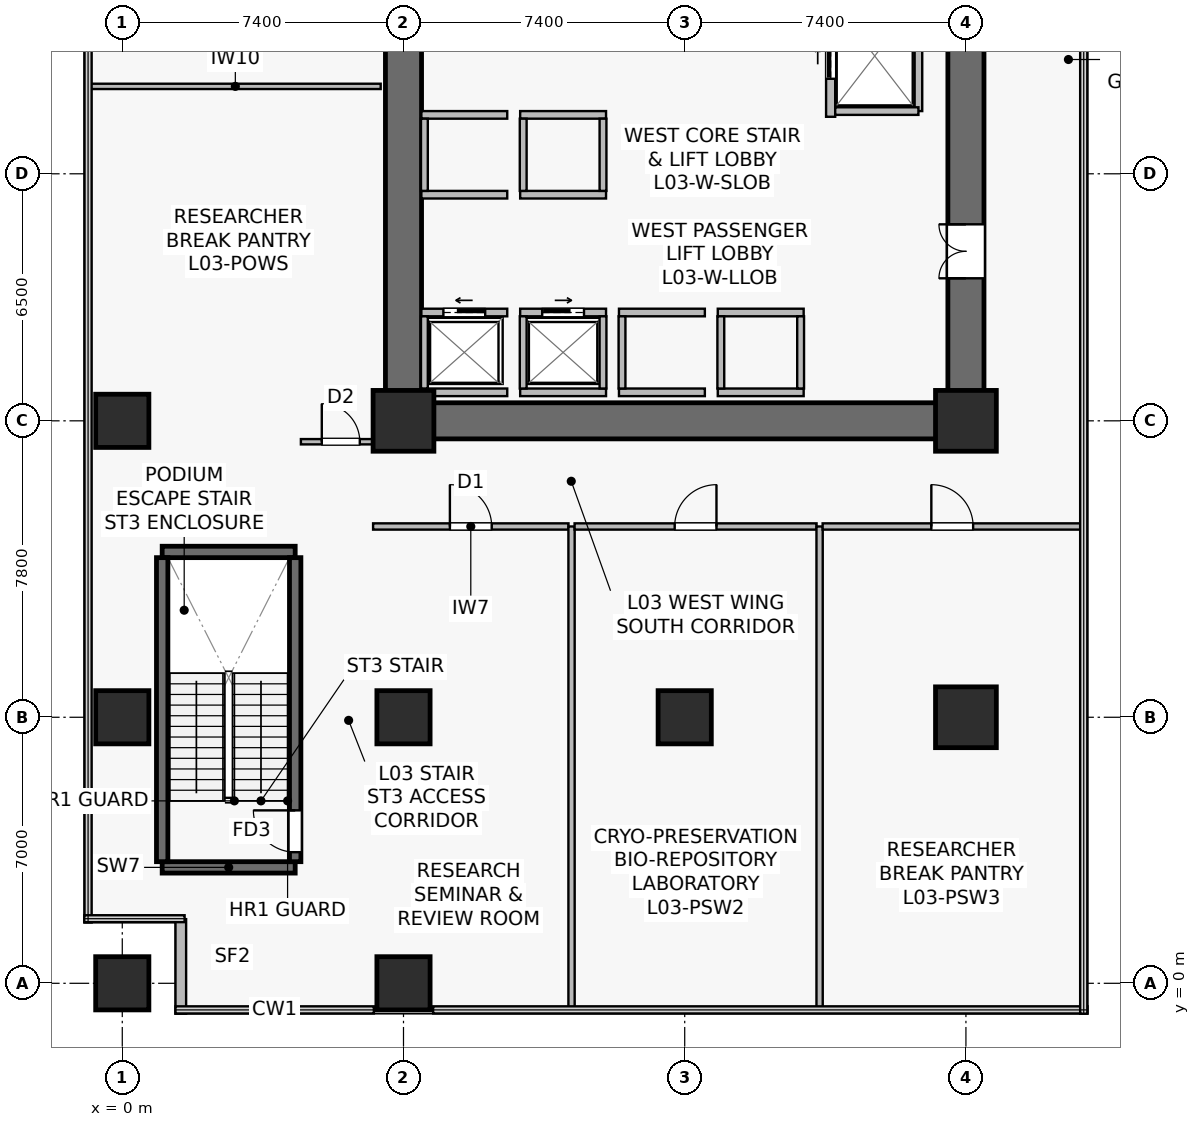
"""IFC4 building model, lengths in metres.
Left out: names, types, materials, properties, quantities, classifications, styles, units other than length and angle.
Written with IfcOpenShell. Run it as: python <this file> out.ifc"""

import sys

from ifc_helpers import new_model, si_unit, direction, frame, frame_2d, origin, origin_2d, place, context, subcontext, project, spatial, rectangle, extrude, source, transform, mapped, element, fill, save


model = new_model("IFC4")
c1 = context("Model", 3, precision=1e-05, world=origin(), true_north=direction((0.0, 1.0)))
c2 = subcontext(c1, "Body", "Model", "MODEL_VIEW")
j1 = project(units=[si_unit("LENGTHUNIT", "METRE"), si_unit("PLANEANGLEUNIT", "RADIAN")], contexts=[c1])
p1 = place(None, origin())
s1 = spatial("IfcSite", under=j1, at=p1, CompositionType="ELEMENT")
p2 = place(p1, origin())
s2 = spatial("IfcBuilding", under=s1, at=p2, CompositionType="ELEMENT")
p3 = place(p2, frame((0.0, 0.0, 10.2)))
s3 = spatial("IfcBuildingStorey", under=s2, at=p3, CompositionType="ELEMENT", Elevation=10.2)
p4 = place(p3, frame((6.925, 14.8, 0.0), z_axis=(0.0, 0.0, 1.0), x_axis=(1.0, 0.0, 0.0)))
e1 = element("IfcWall", 1, at=p4, inside=s3, PredefinedType="SHEAR", context=c2, shape_type="SweptSolid", body=[
    extrude(rectangle(XDim=15.75, YDim=0.95, at=frame_2d((7.875, 0.0))), origin(), (0.0, 0.0, 1.0), 4.45),
])
p5 = place(p3, frame((7.4, 15.275, 0.0), z_axis=(0.0, 0.0, 1.0), x_axis=(0.0, 1.0, 0.0)))
e2 = element("IfcWall", 2, at=p5, inside=s3, PredefinedType="SHEAR", context=c2, shape_type="SweptSolid", body=[
    extrude(rectangle(XDim=18.05, YDim=0.95, at=frame_2d((9.025, 0.0))), origin(), (0.0, 0.0, 1.0), 4.45),
])
p6 = place(p3, frame((22.2, 15.275, 0.0), z_axis=(0.0, 0.0, 1.0), x_axis=(0.0, 1.0, 0.0)))
e3 = element("IfcWall", 3, at=p6, inside=s3, PredefinedType="SHEAR", context=c2, shape_type="SweptSolid", body=[
    extrude(rectangle(XDim=18.05, YDim=0.95, at=frame_2d((9.025, 0.0))), origin(), (0.0, 0.0, 1.0), 4.45),
])
p7 = place(p6, frame((3.275, 0.0, 0.0)))
e4 = element("IfcOpeningElement", 4, at=p7, cuts=e3, PredefinedType="OPENING", context=c2, shape_type="SweptSolid", body=[
    extrude(rectangle(XDim=1.42, YDim=2.2, at=frame_2d((0.71, 1.1))), frame((0.0, 0.485, 0.0), z_axis=(0.0, -1.0, 0.0), x_axis=(1.0, 0.0, 0.0)), (0.0, 0.0, 1.0), 0.97),
])
for number, where, z_axis, x_axis in (
    (5, (1.05, 3.05, 0.0), (0.0, 0.0, 1.0), (1.0, 0.0, 0.0)),
    (6, (1.05, 11.35, 0.0), (0.0, 0.0, 1.0), (1.0, 0.0, 0.0)),
):
    element("IfcWall", number, at=place(p3, frame(where, z_axis=z_axis, x_axis=x_axis)), inside=s3, PredefinedType="SHEAR", context=c2, shape_type="SweptSolid", body=[
        extrude(rectangle(XDim=3.5, YDim=0.3, at=frame_2d((1.75, 0.0))), origin(), (0.0, 0.0, 1.0), 4.45),
    ])
p8 = place(p3, frame((1.05, 3.2, 0.0), z_axis=(0.0, 0.0, 1.0), x_axis=(0.0, 1.0, 0.0)))
e7 = element("IfcWall", 7, at=p8, inside=s3, PredefinedType="SHEAR", context=c2, shape_type="SweptSolid", body=[
    extrude(rectangle(XDim=8.0, YDim=0.3, at=frame_2d((4.0, 0.0))), origin(), (0.0, 0.0, 1.0), 4.45),
])
p9 = place(p3, frame((4.55, 3.2, 0.0), z_axis=(0.0, 0.0, 1.0), x_axis=(0.0, 1.0, 0.0)))
e8 = element("IfcWall", 8, at=p9, inside=s3, PredefinedType="SHEAR", context=c2, shape_type="SweptSolid", body=[
    extrude(rectangle(XDim=8.0, YDim=0.3, at=frame_2d((4.0, 0.0))), origin(), (0.0, 0.0, 1.0), 4.45),
])
p10 = place(p9, frame((0.25, 0.0, 0.0)))
e9 = element("IfcOpeningElement", 9, at=p10, cuts=e8, PredefinedType="OPENING", context=c2, shape_type="SweptSolid", body=[
    extrude(rectangle(XDim=1.1, YDim=2.15, at=frame_2d((0.55, 1.075))), frame((0.0, 0.16, 0.0), z_axis=(0.0, -1.0, 0.0), x_axis=(1.0, 0.0, 0.0)), (0.0, 0.0, 1.0), 0.32),
])
m1 = source(origin(), c2, "Body", "SweptSolid", [
    extrude(rectangle(XDim=1.4, YDim=1.4, at=origin_2d()), origin(), (0.0, 0.0, 1.0), 4.8),
])
p11 = place(p3, frame((14.8, 7.0, 0.0), z_axis=(0.0, 0.0, 1.0), x_axis=(1.0, 0.0, 0.0)))
e10 = element("IfcColumn", 10, at=p11, inside=s3, PredefinedType="COLUMN", context=c2, shape_type="MappedRepresentation", body=[
    mapped(m1, transform((0.0, 0.0, 0.0), scale=1.0)),
])
m2 = source(origin(), c2, "Body", "SweptSolid", [
    extrude(rectangle(XDim=1.6, YDim=1.6, at=origin_2d()), origin(), (0.0, 0.0, 1.0), 4.8),
])
for number, where, z_axis, x_axis in (
    (11, (22.2, 7.0, 0.0), (0.0, 0.0, 1.0), (1.0, 0.0, 0.0)),
    (12, (7.4, 14.8, 0.0), (0.0, 0.0, 1.0), (1.0, 0.0, 0.0)),
    (13, (22.2, 14.8, 0.0), (0.0, 0.0, 1.0), (1.0, 0.0, 0.0)),
):
    element("IfcColumn", number, at=place(p3, frame(where, z_axis=z_axis, x_axis=x_axis)), inside=s3, PredefinedType="COLUMN", context=c2, shape_type="MappedRepresentation", body=[
        mapped(m2, transform((0.0, 0.0, 0.0), scale=1.0)),
    ])
for number, where, z_axis, x_axis in (
    (14, (7.4, 7.0, 0.0), (0.0, 0.0, 1.0), (1.0, 0.0, 0.0)),
    (15, (0.0, 7.0, 0.0), (0.0, 0.0, 1.0), (1.0, 0.0, 0.0)),
    (16, (0.0, 14.8, 0.0), (0.0, 0.0, 1.0), (1.0, 0.0, 0.0)),
    (17, (0.0, 0.0, 0.0), (0.0, 0.0, 1.0), (1.0, 0.0, 0.0)),
    (18, (7.4, 0.0, 0.0), (0.0, 0.0, 1.0), (1.0, 0.0, 0.0)),
):
    element("IfcColumn", number, at=place(p3, frame(where, z_axis=z_axis, x_axis=x_axis)), inside=s3, PredefinedType="COLUMN", context=c2, shape_type="MappedRepresentation", body=[
        mapped(m1, transform((0.0, 0.0, 0.0), scale=1.0)),
    ])
p12 = place(p3, frame((1.54, 1.688, 0.0), z_axis=(0.0, 0.0, 1.0), x_axis=(0.0, -1.0, 0.0)))
e19 = element("IfcWall", 19, at=p12, inside=s3, PredefinedType="STANDARD", context=c2, shape_type="SweptSolid", body=[
    extrude(rectangle(XDim=2.488, YDim=0.28, at=frame_2d((1.244, 0.0))), origin(), (0.0, 0.0, 1.0), 4.45),
])
p13 = place(p3, frame((18.64, 22.8, 0.0), z_axis=(0.0, 0.0, 1.0), x_axis=(0.0, 1.0, 0.0)))
e20 = element("IfcWall", 20, at=p13, inside=s3, PredefinedType="SOLIDWALL", context=c2, shape_type="SweptSolid", body=[
    extrude(rectangle(XDim=6.85, YDim=0.24, at=frame_2d((3.425, 0.0))), origin(), (0.0, 0.0, 1.0), 3.535),
])
p14 = place(p13, frame((4.85, 0.0, 0.0)))
e21 = element("IfcOpeningElement", 21, at=p14, cuts=e20, PredefinedType="OPENING", context=c2, shape_type="SweptSolid", body=[
    extrude(rectangle(XDim=1.1, YDim=2.22, at=frame_2d((0.55, 1.11))), frame((0.0, 0.13, 0.0), z_axis=(0.0, -1.0, 0.0), x_axis=(1.0, 0.0, 0.0)), (0.0, 0.0, 1.0), 0.26),
])
p15 = place(p13, frame((1.0, 0.0, 0.0)))
e22 = element("IfcOpeningElement", 22, at=p15, cuts=e20, PredefinedType="OPENING", context=c2, shape_type="SweptSolid", body=[
    extrude(rectangle(XDim=1.2, YDim=2.22, at=frame_2d((0.6, 1.11))), frame((0.0, 0.13, 0.0), z_axis=(0.0, -1.0, 0.0), x_axis=(1.0, 0.0, 0.0)), (0.0, 0.0, 1.0), 0.26),
])
p16 = place(p3, frame((7.87, 17.65, 0.0), z_axis=(0.0, 0.0, 1.0), x_axis=(1.0, 0.0, 0.0)))
e23 = element("IfcWall", 23, at=p16, inside=s3, PredefinedType="SOLIDWALL", context=c2, shape_type="SweptSolid", body=[
    extrude(rectangle(XDim=2.26, YDim=0.2, at=frame_2d((1.13, 0.0))), origin(), (0.0, 0.0, 1.0), 4.45),
])
p17 = place(p16, frame((0.58, 0.0, 0.0)))
e24 = element("IfcOpeningElement", 24, at=p17, cuts=e23, PredefinedType="OPENING", context=c2, shape_type="SweptSolid", body=[
    extrude(rectangle(XDim=1.1, YDim=2.22, at=frame_2d((0.55, 1.11))), frame((0.0, 0.11, 0.0), z_axis=(0.0, -1.0, 0.0), x_axis=(1.0, 0.0, 0.0)), (0.0, 0.0, 1.0), 0.22),
])
p18 = place(p3, frame((7.87, 15.55, 0.0), z_axis=(0.0, 0.0, 1.0), x_axis=(1.0, 0.0, 0.0)))
e25 = element("IfcWall", 25, at=p18, inside=s3, PredefinedType="SOLIDWALL", context=c2, shape_type="SweptSolid", body=[
    extrude(rectangle(XDim=2.26, YDim=0.2, at=frame_2d((1.13, 0.0))), origin(), (0.0, 0.0, 1.0), 4.45),
])
p19 = place(p3, frame((7.95, 15.65, 0.0), z_axis=(0.0, 0.0, 1.0), x_axis=(0.0, 1.0, 0.0)))
e26 = element("IfcWall", 26, at=p19, inside=s3, PredefinedType="SOLIDWALL", context=c2, shape_type="SweptSolid", body=[
    extrude(rectangle(XDim=1.9, YDim=0.18, at=frame_2d((0.95, 0.0))), origin(), (0.0, 0.0, 1.0), 4.45),
])
p20 = place(p3, frame((10.47, 17.65, 0.0), z_axis=(0.0, 0.0, 1.0), x_axis=(1.0, 0.0, 0.0)))
e27 = element("IfcWall", 27, at=p20, inside=s3, PredefinedType="SOLIDWALL", context=c2, shape_type="SweptSolid", body=[
    extrude(rectangle(XDim=2.26, YDim=0.2, at=frame_2d((1.13, 0.0))), origin(), (0.0, 0.0, 1.0), 4.45),
])
p21 = place(p20, frame((0.58, 0.0, 0.0)))
e28 = element("IfcOpeningElement", 28, at=p21, cuts=e27, PredefinedType="OPENING", context=c2, shape_type="SweptSolid", body=[
    extrude(rectangle(XDim=1.1, YDim=2.22, at=frame_2d((0.55, 1.11))), frame((0.0, 0.11, 0.0), z_axis=(0.0, -1.0, 0.0), x_axis=(1.0, 0.0, 0.0)), (0.0, 0.0, 1.0), 0.22),
])
p22 = place(p3, frame((10.47, 15.55, 0.0), z_axis=(0.0, 0.0, 1.0), x_axis=(1.0, 0.0, 0.0)))
e29 = element("IfcWall", 29, at=p22, inside=s3, PredefinedType="SOLIDWALL", context=c2, shape_type="SweptSolid", body=[
    extrude(rectangle(XDim=2.26, YDim=0.2, at=frame_2d((1.13, 0.0))), origin(), (0.0, 0.0, 1.0), 4.45),
])
for number, where, z_axis, x_axis in (
    (30, (10.55, 15.65, 0.0), (0.0, 0.0, 1.0), (0.0, 1.0, 0.0)),
    (31, (12.65, 15.65, 0.0), (0.0, 0.0, 1.0), (0.0, 1.0, 0.0)),
):
    element("IfcWall", number, at=place(p3, frame(where, z_axis=z_axis, x_axis=x_axis)), inside=s3, PredefinedType="SOLIDWALL", context=c2, shape_type="SweptSolid", body=[
        extrude(rectangle(XDim=1.9, YDim=0.18, at=frame_2d((0.95, 0.0))), origin(), (0.0, 0.0, 1.0), 4.45),
    ])
for number, where, z_axis, x_axis in (
    (32, (13.07, 17.65, 0.0), (0.0, 0.0, 1.0), (1.0, 0.0, 0.0)),
    (33, (13.07, 15.55, 0.0), (0.0, 0.0, 1.0), (1.0, 0.0, 0.0)),
):
    element("IfcWall", number, at=place(p3, frame(where, z_axis=z_axis, x_axis=x_axis)), inside=s3, PredefinedType="SOLIDWALL", context=c2, shape_type="SweptSolid", body=[
        extrude(rectangle(XDim=2.26, YDim=0.2, at=frame_2d((1.13, 0.0))), origin(), (0.0, 0.0, 1.0), 3.735),
    ])
p23 = place(p3, frame((13.15, 15.65, 0.0), z_axis=(0.0, 0.0, 1.0), x_axis=(0.0, 1.0, 0.0)))
e34 = element("IfcWall", 34, at=p23, inside=s3, PredefinedType="SOLIDWALL", context=c2, shape_type="SweptSolid", body=[
    extrude(rectangle(XDim=1.9, YDim=0.18, at=frame_2d((0.95, 0.0))), origin(), (0.0, 0.0, 1.0), 4.45),
])
for number, where, z_axis, x_axis in (
    (35, (15.67, 17.65, 0.0), (0.0, 0.0, 1.0), (1.0, 0.0, 0.0)),
    (36, (15.67, 15.55, 0.0), (0.0, 0.0, 1.0), (1.0, 0.0, 0.0)),
):
    element("IfcWall", number, at=place(p3, frame(where, z_axis=z_axis, x_axis=x_axis)), inside=s3, PredefinedType="SOLIDWALL", context=c2, shape_type="SweptSolid", body=[
        extrude(rectangle(XDim=2.26, YDim=0.2, at=frame_2d((1.13, 0.0))), origin(), (0.0, 0.0, 1.0), 4.45),
    ])
for number, where, z_axis, x_axis in (
    (37, (15.75, 15.65, 0.0), (0.0, 0.0, 1.0), (0.0, 1.0, 0.0)),
    (38, (17.85, 15.65, 0.0), (0.0, 0.0, 1.0), (0.0, 1.0, 0.0)),
):
    element("IfcWall", number, at=place(p3, frame(where, z_axis=z_axis, x_axis=x_axis)), inside=s3, PredefinedType="SOLIDWALL", context=c2, shape_type="SweptSolid", body=[
        extrude(rectangle(XDim=1.9, YDim=0.18, at=frame_2d((0.95, 0.0))), origin(), (0.0, 0.0, 1.0), 4.45),
    ])
for number, where, z_axis, x_axis in (
    (39, (7.87, 20.75, 0.0), (0.0, 0.0, 1.0), (1.0, 0.0, 0.0)),
    (40, (7.87, 22.85, 0.0), (0.0, 0.0, 1.0), (1.0, 0.0, 0.0)),
):
    element("IfcWall", number, at=place(p3, frame(where, z_axis=z_axis, x_axis=x_axis)), inside=s3, PredefinedType="SOLIDWALL", context=c2, shape_type="SweptSolid", body=[
        extrude(rectangle(XDim=2.26, YDim=0.2, at=frame_2d((1.13, 0.0))), origin(), (0.0, 0.0, 1.0), 4.45),
    ])
p24 = place(p3, frame((7.95, 20.85, 0.0), z_axis=(0.0, 0.0, 1.0), x_axis=(0.0, 1.0, 0.0)))
e41 = element("IfcWall", 41, at=p24, inside=s3, PredefinedType="SOLIDWALL", context=c2, shape_type="SweptSolid", body=[
    extrude(rectangle(XDim=1.9, YDim=0.18, at=frame_2d((0.95, 0.0))), origin(), (0.0, 0.0, 1.0), 4.45),
])
for number, where, z_axis, x_axis in (
    (42, (10.47, 20.75, 0.0), (0.0, 0.0, 1.0), (1.0, 0.0, 0.0)),
    (43, (10.47, 22.85, 0.0), (0.0, 0.0, 1.0), (1.0, 0.0, 0.0)),
):
    element("IfcWall", number, at=place(p3, frame(where, z_axis=z_axis, x_axis=x_axis)), inside=s3, PredefinedType="SOLIDWALL", context=c2, shape_type="SweptSolid", body=[
        extrude(rectangle(XDim=2.26, YDim=0.2, at=frame_2d((1.13, 0.0))), origin(), (0.0, 0.0, 1.0), 4.45),
    ])
for number, where, z_axis, x_axis in (
    (44, (10.55, 20.85, 0.0), (0.0, 0.0, 1.0), (0.0, 1.0, 0.0)),
    (45, (12.65, 20.85, 0.0), (0.0, 0.0, 1.0), (0.0, 1.0, 0.0)),
):
    element("IfcWall", number, at=place(p3, frame(where, z_axis=z_axis, x_axis=x_axis)), inside=s3, PredefinedType="SOLIDWALL", context=c2, shape_type="SweptSolid", body=[
        extrude(rectangle(XDim=1.9, YDim=0.18, at=frame_2d((0.95, 0.0))), origin(), (0.0, 0.0, 1.0), 4.45),
    ])
p25 = place(p3, frame((20.95, 22.95, 0.0), z_axis=(0.0, 0.0, 1.0), x_axis=(0.0, 1.0, 0.0)))
e46 = element("IfcWall", 46, at=p25, inside=s3, PredefinedType="SOLIDWALL", context=c2, shape_type="SweptSolid", body=[
    extrude(rectangle(XDim=2.9, YDim=0.2, at=frame_2d((1.45, 0.0))), origin(), (0.0, 0.0, 1.0), 3.535),
])
p26 = place(p3, frame((18.76, 22.95, 0.0), z_axis=(0.0, 0.0, 1.0), x_axis=(1.0, 0.0, 0.0)))
e47 = element("IfcWall", 47, at=p26, inside=s3, PredefinedType="SOLIDWALL", context=c2, shape_type="SweptSolid", body=[
    extrude(rectangle(XDim=2.19, YDim=0.2, at=frame_2d((1.095, 0.0))), origin(), (0.0, 0.0, 1.0), 4.45),
])
p27 = place(p3, frame((-0.85, 23.6, 0.0), z_axis=(0.0, 0.0, 1.0), x_axis=(1.0, 0.0, 0.0)))
e48 = element("IfcWall", 48, at=p27, inside=s3, PredefinedType="PARTITIONING", context=c2, shape_type="SweptSolid", body=[
    extrude(rectangle(XDim=7.65, YDim=0.14, at=frame_2d((3.825, 0.0))), origin(), (0.0, 0.0, 1.0), 3.835),
])
p28 = place(p3, frame((4.7, 14.25, 0.0), z_axis=(0.0, 0.0, 1.0), x_axis=(1.0, 0.0, 0.0)))
e49 = element("IfcWall", 49, at=p28, inside=s3, PredefinedType="PARTITIONING", context=c2, shape_type="SweptSolid", body=[
    extrude(rectangle(XDim=2.1, YDim=0.14, at=frame_2d((1.05, 0.0))), origin(), (0.0, 0.0, 1.0), 4.45),
])
p29 = place(p28, frame((0.55, 0.0, 0.0)))
e50 = element("IfcOpeningElement", 50, at=p29, cuts=e49, PredefinedType="OPENING", context=c2, shape_type="SweptSolid", body=[
    extrude(rectangle(XDim=1.0, YDim=2.15, at=frame_2d((0.5, 1.075))), frame((0.0, 0.08, 0.0), z_axis=(0.0, -1.0, 0.0), x_axis=(1.0, 0.0, 0.0)), (0.0, 0.0, 1.0), 0.16),
])
p30 = place(p3, frame((6.6, 12.02, 0.0), z_axis=(0.0, 0.0, 1.0), x_axis=(1.0, 0.0, 0.0)))
e51 = element("IfcWall", 51, at=p30, inside=s3, PredefinedType="PARTITIONING", context=c2, shape_type="SweptSolid", body=[
    extrude(rectangle(XDim=5.142, YDim=0.165, at=frame_2d((2.571, 0.0))), origin(), (0.0, 0.0, 1.0), 3.735),
])
p31 = place(p30, frame((2.021, 0.0, 0.0)))
e52 = element("IfcOpeningElement", 52, at=p31, cuts=e51, PredefinedType="OPENING", context=c2, shape_type="SweptSolid", body=[
    extrude(rectangle(XDim=1.1, YDim=2.18, at=frame_2d((0.55, 1.09))), frame((0.0, 0.093, 0.0), z_axis=(0.0, -1.0, 0.0), x_axis=(1.0, 0.0, 0.0)), (0.0, 0.0, 1.0), 0.185),
])
p32 = place(p3, frame((11.822, -0.69, 0.0), z_axis=(0.0, 0.0, 1.0), x_axis=(0.0, 1.0, 0.0)))
e53 = element("IfcWall", 53, at=p32, inside=s3, PredefinedType="PARTITIONING", context=c2, shape_type="SweptSolid", body=[
    extrude(rectangle(XDim=12.71, YDim=0.165, at=frame_2d((6.355, 0.0))), origin(), (0.0, 0.0, 1.0), 3.635),
])
p33 = place(p3, frame((11.902, 12.02, 0.0), z_axis=(0.0, 0.0, 1.0), x_axis=(1.0, 0.0, 0.0)))
e54 = element("IfcWall", 54, at=p33, inside=s3, PredefinedType="PARTITIONING", context=c2, shape_type="SweptSolid", body=[
    extrude(rectangle(XDim=6.367, YDim=0.165, at=frame_2d((3.184, 0.0))), origin(), (0.0, 0.0, 1.0), 3.735),
])
p34 = place(p33, frame((2.634, 0.0, 0.0)))
e55 = element("IfcOpeningElement", 55, at=p34, cuts=e54, PredefinedType="OPENING", context=c2, shape_type="SweptSolid", body=[
    extrude(rectangle(XDim=1.1, YDim=2.18, at=frame_2d((0.55, 1.09))), frame((0.0, 0.093, 0.0), z_axis=(0.0, -1.0, 0.0), x_axis=(1.0, 0.0, 0.0)), (0.0, 0.0, 1.0), 0.185),
])
p35 = place(p3, frame((18.35, -0.69, 0.0), z_axis=(0.0, 0.0, 1.0), x_axis=(0.0, 1.0, 0.0)))
e56 = element("IfcWall", 56, at=p35, inside=s3, PredefinedType="PARTITIONING", context=c2, shape_type="SweptSolid", body=[
    extrude(rectangle(XDim=12.71, YDim=0.165, at=frame_2d((6.355, 0.0))), origin(), (0.0, 0.0, 1.0), 3.635),
])
p36 = place(p3, frame((18.429, 12.02, 0.0), z_axis=(0.0, 0.0, 1.0), x_axis=(1.0, 0.0, 0.0)))
e57 = element("IfcWall", 57, at=p36, inside=s3, PredefinedType="PARTITIONING", context=c2, shape_type="SweptSolid", body=[
    extrude(rectangle(XDim=6.821, YDim=0.165, at=frame_2d((3.41, 0.0))), origin(), (0.0, 0.0, 1.0), 3.735),
])
p37 = place(p36, frame((2.86, 0.0, 0.0)))
e58 = element("IfcOpeningElement", 58, at=p37, cuts=e57, PredefinedType="OPENING", context=c2, shape_type="SweptSolid", body=[
    extrude(rectangle(XDim=1.1, YDim=2.18, at=frame_2d((0.55, 1.09))), frame((0.0, 0.093, 0.0), z_axis=(0.0, -1.0, 0.0), x_axis=(1.0, 0.0, 0.0)), (0.0, 0.0, 1.0), 0.185),
])
m3 = source(origin(), c2, "Body", "SweptSolid", [
    extrude(rectangle(XDim=1.1, YDim=2.22, at=frame_2d((0.55, 1.11))), frame((0.0, 0.025, 0.0), z_axis=(0.0, -1.0, 0.0), x_axis=(1.0, 0.0, 0.0)), (0.0, 0.0, 1.0), 0.05),
])
p38 = place(p17, origin())
e59 = element("IfcDoor", 59, at=p38, inside=s3, OperationType="SLIDING_TO_LEFT", PredefinedType="USERDEFINED", context=c2, shape_type="MappedRepresentation", body=[
    mapped(m3, transform((0.0, 0.0, 0.0), scale=1.0)),
])
fill(e24, e59)
p39 = place(p21, origin())
e60 = element("IfcDoor", 60, at=p39, inside=s3, OperationType="SLIDING_TO_RIGHT", PredefinedType="USERDEFINED", context=c2, shape_type="MappedRepresentation", body=[
    mapped(m3, transform((0.0, 0.0, 0.0), scale=1.0)),
])
fill(e28, e60)
m4 = source(origin(), c2, "Body", "SweptSolid", [
    extrude(rectangle(XDim=1.2, YDim=2.22, at=frame_2d((0.6, 1.11))), frame((0.0, 0.025, 0.0), z_axis=(0.0, -1.0, 0.0), x_axis=(1.0, 0.0, 0.0)), (0.0, 0.0, 1.0), 0.05),
])
p40 = place(p15, origin())
e61 = element("IfcDoor", 61, at=p40, inside=s3, OperationType="SLIDING_TO_RIGHT", PredefinedType="USERDEFINED", context=c2, shape_type="MappedRepresentation", body=[
    mapped(m4, transform((0.0, 0.0, 0.0), scale=1.0)),
])
fill(e22, e61)
m5 = source(origin(), c2, "Body", "SweptSolid", [
    extrude(rectangle(XDim=1.42, YDim=2.2, at=frame_2d((0.71, 1.1))), frame((0.0, 0.025, 0.0), z_axis=(0.0, -1.0, 0.0), x_axis=(1.0, 0.0, 0.0)), (0.0, 0.0, 1.0), 0.05),
])
p41 = place(p7, origin())
e62 = element("IfcDoor", 62, at=p41, inside=s3, OperationType="DOUBLE_DOOR_SINGLE_SWING", PredefinedType="DOOR", context=c2, shape_type="MappedRepresentation", body=[
    mapped(m5, transform((0.0, 0.0, 0.0), scale=1.0)),
])
fill(e4, e62)
m6 = source(origin(), c2, "Body", "SweptSolid", [
    extrude(rectangle(XDim=1.1, YDim=2.15, at=frame_2d((0.55, 1.075))), frame((0.0, 0.025, 0.0), z_axis=(0.0, -1.0, 0.0), x_axis=(1.0, 0.0, 0.0)), (0.0, 0.0, 1.0), 0.05),
])
p42 = place(p10, origin())
e63 = element("IfcDoor", 63, at=p42, inside=s3, OperationType="SINGLE_SWING_RIGHT", PredefinedType="DOOR", context=c2, shape_type="MappedRepresentation", body=[
    mapped(m6, transform((0.0, 0.0, 0.0), scale=1.0)),
])
fill(e9, e63)
m7 = source(origin(), c2, "Body", "SweptSolid", [
    extrude(rectangle(XDim=1.0, YDim=2.15, at=frame_2d((0.5, 1.075))), frame((0.0, 0.025, 0.0), z_axis=(0.0, -1.0, 0.0), x_axis=(1.0, 0.0, 0.0)), (0.0, 0.0, 1.0), 0.05),
])
p43 = place(p29, origin())
e64 = element("IfcDoor", 64, at=p43, inside=s3, OperationType="SINGLE_SWING_LEFT", PredefinedType="DOOR", context=c2, shape_type="MappedRepresentation", body=[
    mapped(m7, transform((0.0, 0.0, 0.0), scale=1.0)),
])
fill(e50, e64)
m8 = source(origin(), c2, "Body", "SweptSolid", [
    extrude(rectangle(XDim=1.1, YDim=2.18, at=frame_2d((0.55, 1.09))), frame((0.0, 0.025, 0.0), z_axis=(0.0, -1.0, 0.0), x_axis=(1.0, 0.0, 0.0)), (0.0, 0.0, 1.0), 0.05),
])
p44 = place(p31, origin())
e65 = element("IfcDoor", 65, at=p44, inside=s3, OperationType="SINGLE_SWING_LEFT", PredefinedType="DOOR", context=c2, shape_type="MappedRepresentation", body=[
    mapped(m8, transform((0.0, 0.0, 0.0), scale=1.0)),
])
fill(e52, e65)
p45 = place(p34, origin())
e66 = element("IfcDoor", 66, at=p45, inside=s3, OperationType="SINGLE_SWING_RIGHT", PredefinedType="DOOR", context=c2, shape_type="MappedRepresentation", body=[
    mapped(m8, transform((0.0, 0.0, 0.0), scale=1.0)),
])
fill(e55, e66)
p46 = place(p37, origin())
e67 = element("IfcDoor", 67, at=p46, inside=s3, OperationType="SINGLE_SWING_LEFT", PredefinedType="DOOR", context=c2, shape_type="MappedRepresentation", body=[
    mapped(m8, transform((0.0, 0.0, 0.0), scale=1.0)),
])
fill(e58, e67)
save(model, sys.argv[1])
